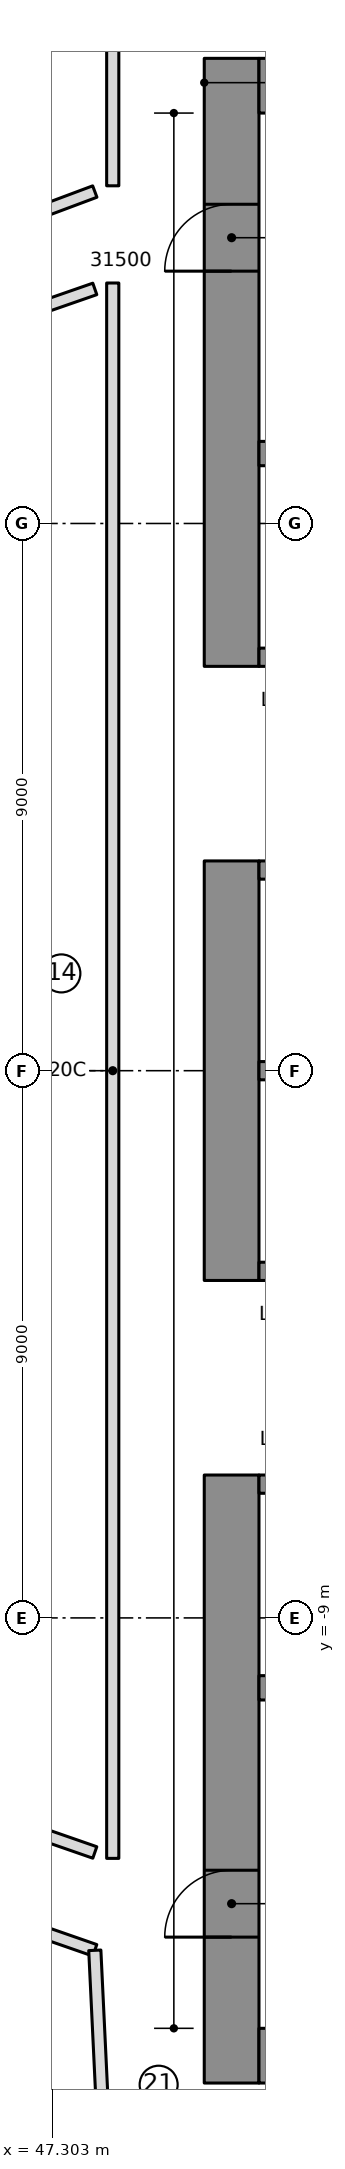
"""IFC4 building model, lengths in metres.
Left out: names, types, materials, properties, quantities, classifications, styles, units other than length and angle.
Written with IfcOpenShell. Run it as: python <this file> out.ifc"""

import sys

from ifc_helpers import new_model, si_unit, direction, frame, frame_2d, origin, place, context, subcontext, project, spatial, rectangle, extrude, element, fill, save


model = new_model("IFC4")
c1 = context("Model", 3, precision=1e-05, world=origin(), true_north=direction((0.0, 1.0)))
c2 = subcontext(c1, "Body", "Model", "MODEL_VIEW")
j1 = project(units=[si_unit("LENGTHUNIT", "METRE"), si_unit("PLANEANGLEUNIT", "RADIAN")], contexts=[c1])
p1 = place(None, origin())
s1 = spatial("IfcSite", under=j1, at=p1, CompositionType="ELEMENT")
p2 = place(p1, origin())
s2 = spatial("IfcBuilding", under=s1, at=p2, CompositionType="ELEMENT")
p3 = place(p2, frame((0.0, 0.0, 130.2)))
s3 = spatial("IfcBuildingStorey", under=s2, at=p3, CompositionType="ELEMENT", Elevation=130.2)
p4 = place(p3, frame((50.25, 6.65, 0.0), z_axis=(0.0, 0.0, 1.0), x_axis=(0.0, 1.0, 0.0)))
e1 = element("IfcWall", 1, at=p4, inside=s3, PredefinedType="SHEAR", context=c2, shape_type="SweptSolid", body=[
    extrude(rectangle(XDim=10.0, YDim=0.9, at=frame_2d((5.0, 0.0))), origin(), (0.0, 0.0, 1.0), 3.55),
])
p5 = place(p4, frame((6.5, 0.0, 0.0)))
e2 = element("IfcOpeningElement", 2, at=p5, cuts=e1, PredefinedType="OPENING", context=c2, shape_type="SweptSolid", body=[
    extrude(rectangle(XDim=1.1, YDim=2.1, at=frame_2d((0.55, 1.05))), frame((0.0, 0.46, 0.0), z_axis=(0.0, -1.0, 0.0), x_axis=(1.0, 0.0, 0.0)), (0.0, 0.0, 1.0), 0.92),
])
p6 = place(p3, frame((50.25, -3.45, 0.0), z_axis=(0.0, 0.0, 1.0), x_axis=(0.0, 1.0, 0.0)))
e3 = element("IfcWall", 3, at=p6, inside=s3, PredefinedType="SHEAR", context=c2, shape_type="SweptSolid", body=[
    extrude(rectangle(XDim=6.9, YDim=0.9, at=frame_2d((3.45, 0.0))), origin(), (0.0, 0.0, 1.0), 3.55),
])
p7 = place(p3, frame((50.25, -16.65, 0.0), z_axis=(0.0, 0.0, 1.0), x_axis=(0.0, 1.0, 0.0)))
e4 = element("IfcWall", 4, at=p7, inside=s3, PredefinedType="SHEAR", context=c2, shape_type="SweptSolid", body=[
    extrude(rectangle(XDim=10.0, YDim=0.9, at=frame_2d((5.0, 0.0))), origin(), (0.0, 0.0, 1.0), 3.55),
])
p8 = place(p7, frame((2.4, 0.0, 0.0)))
e5 = element("IfcOpeningElement", 5, at=p8, cuts=e4, PredefinedType="OPENING", context=c2, shape_type="SweptSolid", body=[
    extrude(rectangle(XDim=1.1, YDim=2.1, at=frame_2d((0.55, 1.05))), frame((0.0, 0.46, 0.0), z_axis=(0.0, -1.0, 0.0), x_axis=(1.0, 0.0, 0.0)), (0.0, 0.0, 1.0), 0.92),
])
for number, where, z_axis, x_axis in (
    (6, (50.7, 16.2, 0.0), (0.0, 0.0, 1.0), (1.0, 0.0, 0.0)),
    (7, (50.7, -16.2, 0.0), (0.0, 0.0, 1.0), (1.0, 0.0, 0.0)),
):
    element("IfcWall", number, at=place(p3, frame(where, z_axis=z_axis, x_axis=x_axis)), inside=s3, PredefinedType="SHEAR", context=c2, shape_type="SweptSolid", body=[
        extrude(rectangle(XDim=13.92, YDim=0.9, at=frame_2d((6.96, 0.0))), origin(), (0.0, 0.0, 1.0), 3.55),
    ])
p9 = place(p3, frame((50.7, 10.15, 0.0), z_axis=(0.0, 0.0, 1.0), x_axis=(1.0, 0.0, 0.0)))
e8 = element("IfcWall", 8, at=p9, inside=s3, PredefinedType="SHEAR", context=c2, shape_type="SweptSolid", body=[
    extrude(rectangle(XDim=13.02, YDim=0.4, at=frame_2d((6.51, 0.0))), origin(), (0.0, 0.0, 1.0), 3.55),
])
p10 = place(p9, frame((0.7, 0.0, 0.0)))
e9 = element("IfcOpeningElement", 9, at=p10, cuts=e8, PredefinedType="OPENING", context=c2, shape_type="SweptSolid", body=[
    extrude(rectangle(XDim=1.1, YDim=2.1, at=frame_2d((0.55, 1.05))), frame((0.0, 0.21, 0.0), z_axis=(0.0, -1.0, 0.0), x_axis=(1.0, 0.0, 0.0)), (0.0, 0.0, 1.0), 0.42),
])
p11 = place(p9, frame((3.5, 0.0, 0.0)))
e10 = element("IfcOpeningElement", 10, at=p11, cuts=e8, PredefinedType="OPENING", context=c2, shape_type="SweptSolid", body=[
    extrude(rectangle(XDim=1.1, YDim=2.1, at=frame_2d((0.55, 1.05))), frame((0.0, 0.21, 0.0), z_axis=(0.0, -1.0, 0.0), x_axis=(1.0, 0.0, 0.0)), (0.0, 0.0, 1.0), 0.42),
])
p12 = place(p3, frame((50.7, -10.15, 0.0), z_axis=(0.0, 0.0, 1.0), x_axis=(1.0, 0.0, 0.0)))
e11 = element("IfcWall", 11, at=p12, inside=s3, PredefinedType="SHEAR", context=c2, shape_type="SweptSolid", body=[
    extrude(rectangle(XDim=13.02, YDim=0.4, at=frame_2d((6.51, 0.0))), origin(), (0.0, 0.0, 1.0), 3.55),
])
p13 = place(p3, frame((50.7, 0.0, 0.0), z_axis=(0.0, 0.0, 1.0), x_axis=(1.0, 0.0, 0.0)))
e12 = element("IfcWall", 12, at=p13, inside=s3, PredefinedType="SHEAR", context=c2, shape_type="SweptSolid", body=[
    extrude(rectangle(XDim=10.9, YDim=0.3, at=frame_2d((5.45, 0.0))), origin(), (0.0, 0.0, 1.0), 3.55),
])
p14 = place(p3, frame((50.7, 3.3, 0.0), z_axis=(0.0, 0.0, 1.0), x_axis=(1.0, 0.0, 0.0)))
e13 = element("IfcWall", 13, at=p14, inside=s3, PredefinedType="SHEAR", context=c2, shape_type="SweptSolid", body=[
    extrude(rectangle(XDim=10.9, YDim=0.3, at=frame_2d((5.45, 0.0))), origin(), (0.0, 0.0, 1.0), 3.55),
])
p15 = place(p14, frame((0.8, 0.0, 0.0)))
e14 = element("IfcOpeningElement", 14, at=p15, cuts=e13, PredefinedType="OPENING", context=c2, shape_type="SweptSolid", body=[
    extrude(rectangle(XDim=0.9, YDim=2.1, at=frame_2d((0.45, 1.05))), frame((0.0, 0.16, 0.0), z_axis=(0.0, -1.0, 0.0), x_axis=(1.0, 0.0, 0.0)), (0.0, 0.0, 1.0), 0.32),
])
p16 = place(p14, frame((3.6, 0.0, 0.0)))
e15 = element("IfcOpeningElement", 15, at=p16, cuts=e13, PredefinedType="OPENING", context=c2, shape_type="SweptSolid", body=[
    extrude(rectangle(XDim=0.9, YDim=2.1, at=frame_2d((0.45, 1.05))), frame((0.0, 0.16, 0.0), z_axis=(0.0, -1.0, 0.0), x_axis=(1.0, 0.0, 0.0)), (0.0, 0.0, 1.0), 0.32),
])
p17 = place(p14, frame((6.4, 0.0, 0.0)))
e16 = element("IfcOpeningElement", 16, at=p17, cuts=e13, PredefinedType="OPENING", context=c2, shape_type="SweptSolid", body=[
    extrude(rectangle(XDim=0.9, YDim=2.1, at=frame_2d((0.45, 1.05))), frame((0.0, 0.16, 0.0), z_axis=(0.0, -1.0, 0.0), x_axis=(1.0, 0.0, 0.0)), (0.0, 0.0, 1.0), 0.32),
])
p18 = place(p14, frame((9.2, 0.0, 0.0)))
e17 = element("IfcOpeningElement", 17, at=p18, cuts=e13, PredefinedType="OPENING", context=c2, shape_type="SweptSolid", body=[
    extrude(rectangle(XDim=0.9, YDim=2.1, at=frame_2d((0.45, 1.05))), frame((0.0, 0.16, 0.0), z_axis=(0.0, -1.0, 0.0), x_axis=(1.0, 0.0, 0.0)), (0.0, 0.0, 1.0), 0.32),
])
p19 = place(p3, frame((50.7, 6.8, 0.0), z_axis=(0.0, 0.0, 1.0), x_axis=(1.0, 0.0, 0.0)))
e18 = element("IfcWall", 18, at=p19, inside=s3, PredefinedType="SHEAR", context=c2, shape_type="SweptSolid", body=[
    extrude(rectangle(XDim=10.9, YDim=0.3, at=frame_2d((5.45, 0.0))), origin(), (0.0, 0.0, 1.0), 3.55),
])
p20 = place(p19, frame((6.3, 0.0, 0.0)))
e19 = element("IfcOpeningElement", 19, at=p20, cuts=e18, PredefinedType="OPENING", context=c2, shape_type="SweptSolid", body=[
    extrude(rectangle(XDim=1.1, YDim=2.1, at=frame_2d((0.55, 1.05))), frame((0.0, 0.16, 0.0), z_axis=(0.0, -1.0, 0.0), x_axis=(1.0, 0.0, 0.0)), (0.0, 0.0, 1.0), 0.32),
])
p21 = place(p19, frame((9.1, 0.0, 0.0)))
e20 = element("IfcOpeningElement", 20, at=p21, cuts=e18, PredefinedType="OPENING", context=c2, shape_type="SweptSolid", body=[
    extrude(rectangle(XDim=1.1, YDim=2.1, at=frame_2d((0.55, 1.05))), frame((0.0, 0.16, 0.0), z_axis=(0.0, -1.0, 0.0), x_axis=(1.0, 0.0, 0.0)), (0.0, 0.0, 1.0), 0.32),
])
p22 = place(p3, frame((50.7, -3.3, 0.0), z_axis=(0.0, 0.0, 1.0), x_axis=(1.0, 0.0, 0.0)))
e21 = element("IfcWall", 21, at=p22, inside=s3, PredefinedType="SHEAR", context=c2, shape_type="SweptSolid", body=[
    extrude(rectangle(XDim=10.9, YDim=0.3, at=frame_2d((5.45, 0.0))), origin(), (0.0, 0.0, 1.0), 3.55),
])
p23 = place(p22, frame((9.2, 0.0, 0.0)))
e22 = element("IfcOpeningElement", 22, at=p23, cuts=e21, PredefinedType="OPENING", context=c2, shape_type="SweptSolid", body=[
    extrude(rectangle(XDim=0.9, YDim=2.1, at=frame_2d((0.45, 1.05))), frame((0.0, 0.16, 0.0), z_axis=(0.0, -1.0, 0.0), x_axis=(1.0, 0.0, 0.0)), (0.0, 0.0, 1.0), 0.32),
])
p24 = place(p3, frame((50.7, -6.8, 0.0), z_axis=(0.0, 0.0, 1.0), x_axis=(1.0, 0.0, 0.0)))
e23 = element("IfcWall", 23, at=p24, inside=s3, PredefinedType="SHEAR", context=c2, shape_type="SweptSolid", body=[
    extrude(rectangle(XDim=10.9, YDim=0.3, at=frame_2d((5.45, 0.0))), origin(), (0.0, 0.0, 1.0), 3.55),
])
p25 = place(p24, frame((0.7, 0.0, 0.0)))
e24 = element("IfcOpeningElement", 24, at=p25, cuts=e23, PredefinedType="OPENING", context=c2, shape_type="SweptSolid", body=[
    extrude(rectangle(XDim=1.1, YDim=2.1, at=frame_2d((0.55, 1.05))), frame((0.0, 0.16, 0.0), z_axis=(0.0, -1.0, 0.0), x_axis=(1.0, 0.0, 0.0)), (0.0, 0.0, 1.0), 0.32),
])
p26 = place(p24, frame((3.5, 0.0, 0.0)))
e25 = element("IfcOpeningElement", 25, at=p26, cuts=e23, PredefinedType="OPENING", context=c2, shape_type="SweptSolid", body=[
    extrude(rectangle(XDim=1.1, YDim=2.1, at=frame_2d((0.55, 1.05))), frame((0.0, 0.16, 0.0), z_axis=(0.0, -1.0, 0.0), x_axis=(1.0, 0.0, 0.0)), (0.0, 0.0, 1.0), 0.32),
])
p27 = place(p24, frame((6.3, 0.0, 0.0)))
e26 = element("IfcOpeningElement", 26, at=p27, cuts=e23, PredefinedType="OPENING", context=c2, shape_type="SweptSolid", body=[
    extrude(rectangle(XDim=1.1, YDim=2.1, at=frame_2d((0.55, 1.05))), frame((0.0, 0.16, 0.0), z_axis=(0.0, -1.0, 0.0), x_axis=(1.0, 0.0, 0.0)), (0.0, 0.0, 1.0), 0.32),
])
p28 = place(p24, frame((9.1, 0.0, 0.0)))
e27 = element("IfcOpeningElement", 27, at=p28, cuts=e23, PredefinedType="OPENING", context=c2, shape_type="SweptSolid", body=[
    extrude(rectangle(XDim=1.1, YDim=2.1, at=frame_2d((0.55, 1.05))), frame((0.0, 0.16, 0.0), z_axis=(0.0, -1.0, 0.0), x_axis=(1.0, 0.0, 0.0)), (0.0, 0.0, 1.0), 0.32),
])
p29 = place(p3, frame((48.0, 14.459, 0.0), z_axis=(0.0, 0.0, 1.0), x_axis=(-0.936637096294, -0.350301227297, 0.0)))
e28 = element("IfcWall", 28, at=p29, inside=s3, PredefinedType="PARTITIONING", context=c2, shape_type="SweptSolid", body=[
    extrude(rectangle(XDim=9.796, YDim=0.2, at=frame_2d((4.898, 0.0))), origin(), (0.0, 0.0, 1.0), 3.25),
])
p30 = place(p29, frame((4.398, 0.0, 0.0)))
e29 = element("IfcOpeningElement", 29, at=p30, cuts=e28, PredefinedType="OPENING", context=c2, shape_type="SweptSolid", body=[
    extrude(rectangle(XDim=1.5, YDim=2.1, at=frame_2d((0.75, 1.05))), frame((0.0, 0.11, 0.0), z_axis=(0.0, -1.0, 0.0), x_axis=(1.0, 0.0, 0.0)), (0.0, 0.0, 1.0), 0.22),
])
p31 = place(p3, frame((47.012, -14.124, 0.0), z_axis=(0.0, 0.0, 1.0), x_axis=(0.944566081842, -0.32832136244, 0.0)))
e30 = element("IfcWall", 30, at=p31, inside=s3, PredefinedType="PARTITIONING", context=c2, shape_type="SweptSolid", body=[
    extrude(rectangle(XDim=1.045, YDim=0.2, at=frame_2d((0.523, 0.0))), origin(), (0.0, 0.0, 1.0), 3.25),
])
for number, where, z_axis, x_axis in (
    (31, (46.781, 12.434, 0.0), (0.0, 0.0, 1.0), (0.945, 0.328, 0.0)),
    (32, (48.0, -12.858, 0.0), (0.0, 0.0, 1.0), (-0.945, 0.328, 0.0)),
):
    element("IfcWall", number, at=place(p3, frame(where, z_axis=z_axis, x_axis=x_axis)), inside=s3, PredefinedType="PARTITIONING", context=c2, shape_type="SweptSolid", body=[
        extrude(rectangle(XDim=1.29, YDim=0.2, at=frame_2d((0.645, 0.0))), origin(), (0.0, 0.0, 1.0), 3.25),
    ])
p32 = place(p3, frame((48.0, -14.467, 0.0), z_axis=(0.0, 0.0, 1.0), x_axis=(0.047837808481, -0.998855116661, 0.0)))
e33 = element("IfcWall", 33, at=p32, inside=s3, PredefinedType="PARTITIONING", context=c2, shape_type="SweptSolid", body=[
    extrude(rectangle(XDim=5.828, YDim=0.2, at=frame_2d((2.914, 0.0))), origin(), (0.0, 0.0, 1.0), 3.25),
])
p33 = place(p32, frame((2.414, 0.0, 0.0)))
e34 = element("IfcOpeningElement", 34, at=p33, cuts=e33, PredefinedType="OPENING", context=c2, shape_type="SweptSolid", body=[
    extrude(rectangle(XDim=1.5, YDim=2.1, at=frame_2d((0.75, 1.05))), frame((0.0, 0.11, 0.0), z_axis=(0.0, -1.0, 0.0), x_axis=(1.0, 0.0, 0.0)), (0.0, 0.0, 1.0), 0.22),
])
p34 = place(p3, frame((48.295, 12.955, 0.0), z_axis=(0.0, 0.0, 1.0), x_axis=(0.0, -1.0, 0.0)))
e35 = element("IfcWall", 35, at=p34, inside=s3, PredefinedType="PARTITIONING", context=c2, shape_type="SweptSolid", body=[
    extrude(rectangle(XDim=25.91, YDim=0.2, at=frame_2d((12.955, 0.0))), origin(), (0.0, 0.0, 1.0), 3.25),
])
p35 = place(p3, frame((48.295, 20.501, 0.0), z_axis=(0.0, 0.0, 1.0), x_axis=(-4.1050903e-05, -0.999999999157, 0.0)))
e36 = element("IfcWall", 36, at=p35, inside=s3, PredefinedType="PARTITIONING", context=c2, shape_type="SweptSolid", body=[
    extrude(rectangle(XDim=5.947, YDim=0.2, at=frame_2d((2.974, 0.0))), origin(), (0.0, 0.0, 1.0), 3.25),
])
p36 = place(p5, origin())
e37 = element("IfcDoor", 37, at=p36, inside=s3, OperationType="SINGLE_SWING_RIGHT", PredefinedType="DOOR", context=c2, shape_type="SweptSolid", body=[
    extrude(rectangle(XDim=1.1, YDim=2.1, at=frame_2d((0.55, 1.05))), frame((0.0, 0.025, 0.0), z_axis=(0.0, -1.0, 0.0), x_axis=(1.0, 0.0, 0.0)), (0.0, 0.0, 1.0), 0.05),
])
fill(e2, e37)
p37 = place(p8, origin())
e38 = element("IfcDoor", 38, at=p37, inside=s3, OperationType="SINGLE_SWING_RIGHT", PredefinedType="DOOR", context=c2, shape_type="SweptSolid", body=[
    extrude(rectangle(XDim=1.1, YDim=2.1, at=frame_2d((0.55, 1.05))), frame((0.0, 0.025, 0.0), z_axis=(0.0, -1.0, 0.0), x_axis=(1.0, 0.0, 0.0)), (0.0, 0.0, 1.0), 0.05),
])
fill(e5, e38)
save(model, sys.argv[1])
